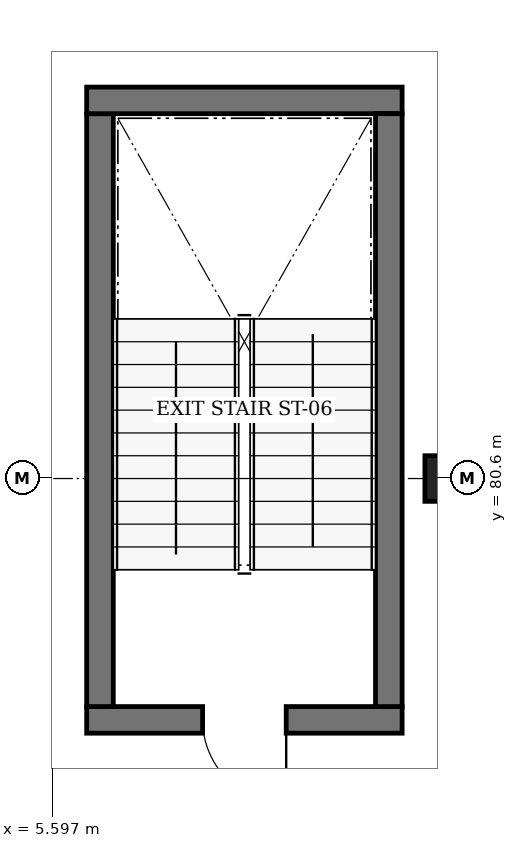
"""IFC4 building model, lengths in metres.
Left out: names, types, materials, properties, quantities, classifications, styles, units other than length and angle.
Written with IfcOpenShell. Run it as: python <this file> out.ifc"""

import sys

from ifc_helpers import new_model, si_unit, direction, frame, frame_2d, origin, origin_2d, place, context, subcontext, project, spatial, rectangle, extrude, element, fill, save


model = new_model("IFC4")
c1 = context("Model", 3, precision=1e-05, world=origin(), true_north=direction((0.0, 1.0)))
c2 = subcontext(c1, "Body", "Model", "MODEL_VIEW")
j1 = project(units=[si_unit("LENGTHUNIT", "METRE"), si_unit("PLANEANGLEUNIT", "RADIAN")], contexts=[c1])
p1 = place(None, origin())
s1 = spatial("IfcSite", under=j1, at=p1, CompositionType="ELEMENT")
p2 = place(p1, origin())
s2 = spatial("IfcBuilding", under=s1, at=p2, CompositionType="ELEMENT")
p3 = place(p2, frame((0.0, 0.0, 4.8)))
s3 = spatial("IfcBuildingStorey", under=s2, at=p3, CompositionType="ELEMENT", Elevation=4.8)
p4 = place(p3, frame((10.8, 80.6, 0.0), z_axis=(0.0, 0.0, 1.0), x_axis=(1.0, 0.0, 0.0)))
e1 = element("IfcColumn", 1, at=p4, inside=s3, PredefinedType="COLUMN", context=c2, shape_type="SweptSolid", body=[
    extrude(rectangle(XDim=0.6, YDim=0.6, at=origin_2d()), origin(), (0.0, 0.0, 1.0), 4.2),
])
p5 = place(p3, frame((10.2, 77.425, 0.0), z_axis=(0.0, 0.0, 1.0), x_axis=(-1.0, 0.0, 0.0)))
e2 = element("IfcWall", 2, at=p5, inside=s3, PredefinedType="SOLIDWALL", context=c2, shape_type="SweptSolid", body=[
    extrude(rectangle(XDim=4.15, YDim=0.35, at=frame_2d((2.075, 0.0))), origin(), (0.0, 0.0, 1.0), 4.2),
])
p6 = place(p5, frame((1.525, 0.0, 0.0)))
e3 = element("IfcOpeningElement", 3, at=p6, cuts=e2, PredefinedType="OPENING", context=c2, shape_type="SweptSolid", body=[
    extrude(rectangle(XDim=1.1, YDim=2.15, at=frame_2d((0.55, 1.075))), frame((0.0, 0.195, 0.0), z_axis=(0.0, -1.0, 0.0), x_axis=(1.0, 0.0, 0.0)), (0.0, 0.0, 1.0), 0.39),
])
p7 = place(p3, frame((6.225, 77.6, 0.0), z_axis=(0.0, 0.0, 1.0), x_axis=(0.0, 1.0, 0.0)))
e4 = element("IfcWall", 4, at=p7, inside=s3, PredefinedType="SOLIDWALL", context=c2, shape_type="SweptSolid", body=[
    extrude(rectangle(XDim=7.8, YDim=0.35, at=frame_2d((3.9, 0.0))), origin(), (0.0, 0.0, 1.0), 4.2),
])
p8 = place(p3, frame((6.05, 85.575, 0.0), z_axis=(0.0, 0.0, 1.0), x_axis=(1.0, 0.0, 0.0)))
e5 = element("IfcWall", 5, at=p8, inside=s3, PredefinedType="SOLIDWALL", context=c2, shape_type="SweptSolid", body=[
    extrude(rectangle(XDim=4.15, YDim=0.35, at=frame_2d((2.075, 0.0))), origin(), (0.0, 0.0, 1.0), 4.2),
])
p9 = place(p3, frame((10.025, 85.4, 0.0), z_axis=(0.0, 0.0, 1.0), x_axis=(0.0, -1.0, 0.0)))
e6 = element("IfcWall", 6, at=p9, inside=s3, PredefinedType="SOLIDWALL", context=c2, shape_type="SweptSolid", body=[
    extrude(rectangle(XDim=7.8, YDim=0.35, at=frame_2d((3.9, 0.0))), origin(), (0.0, 0.0, 1.0), 4.2),
])
p10 = place(p6, origin())
e7 = element("IfcDoor", 7, at=p10, inside=s3, OperationType="SINGLE_SWING_LEFT", PredefinedType="DOOR", context=c2, shape_type="SweptSolid", body=[
    extrude(rectangle(XDim=1.1, YDim=2.15, at=frame_2d((0.55, 1.075))), frame((0.0, 0.025, 0.0), z_axis=(0.0, -1.0, 0.0), x_axis=(1.0, 0.0, 0.0)), (0.0, 0.0, 1.0), 0.05),
])
fill(e3, e7)
save(model, sys.argv[1])
